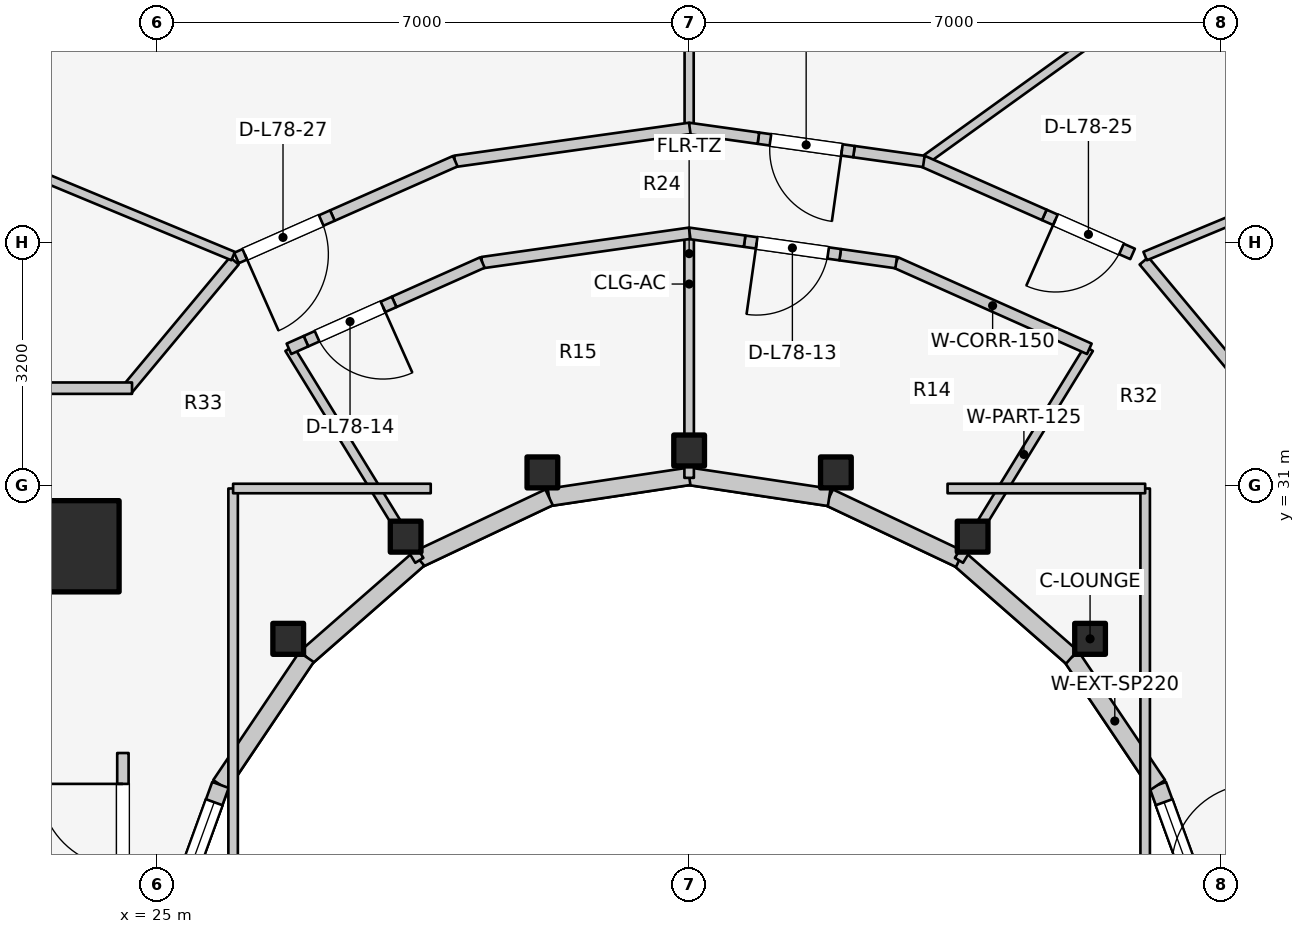
"""IFC4 building model, lengths in metres.
Left out: names, types, materials, properties, quantities, classifications, styles, units other than length and angle.
Written with IfcOpenShell. Run it as: python <this file> out.ifc"""

import sys

from ifc_helpers import new_model, si_unit, direction, frame, frame_2d, origin, origin_2d, place, context, subcontext, project, spatial, rectangle, i_section, extrude, element, fill, save


model = new_model("IFC4")
c1 = context("Model", 3, precision=1e-05, world=origin(), true_north=direction((0.0, 1.0)))
c2 = subcontext(c1, "Body", "Model", "MODEL_VIEW")
j1 = project(units=[si_unit("LENGTHUNIT", "METRE"), si_unit("PLANEANGLEUNIT", "RADIAN")], contexts=[c1])
p1 = place(None, origin())
s1 = spatial("IfcSite", under=j1, at=p1, CompositionType="ELEMENT")
p2 = place(p1, origin())
s2 = spatial("IfcBuilding", under=s1, at=p2, CompositionType="ELEMENT")
p3 = place(p2, frame((0.0, 0.0, 256.8)))
s3 = spatial("IfcBuildingStorey", under=s2, at=p3, CompositionType="ELEMENT", Elevation=256.8)
p4 = place(p3, frame((19.65, 30.35, 0.0), z_axis=(0.0, 0.0, 1.0), x_axis=(1.0, 0.0, 0.0)))
e1 = element("IfcWall", 1, at=p4, inside=s3, PredefinedType="SHEAR", context=c2, shape_type="SweptSolid", body=[
    extrude(rectangle(XDim=4.5, YDim=0.45, at=frame_2d((2.25, 0.0))), origin(), (0.0, 0.0, 1.0), 3.6),
])
p5 = place(p3, frame((23.9, 30.2, 0.0), z_axis=(0.0, 0.0, 1.0), x_axis=(1.0, 0.0, 0.0)))
e2 = element("IfcColumn", 2, at=p5, inside=s3, PredefinedType="COLUMN", context=c2, shape_type="SweptSolid", body=[
    extrude(rectangle(XDim=1.2, YDim=1.2, at=origin_2d()), origin(), (0.0, 0.0, 1.0), 3.6),
])
for number, where, z_axis, x_axis in (
    (3, (37.275, 28.982, 0.0), (0.0, 0.0, 1.0), (1.0, 0.0, 0.0)),
    (4, (35.73, 30.327, 0.0), (0.0, 0.0, 1.0), (1.0, 0.0, 0.0)),
    (5, (33.931, 31.172, 0.0), (0.0, 0.0, 1.0), (1.0, 0.0, 0.0)),
    (6, (32.0, 31.46, 0.0), (0.0, 0.0, 1.0), (1.0, 0.0, 0.0)),
    (7, (30.069, 31.172, 0.0), (0.0, 0.0, 1.0), (1.0, 0.0, 0.0)),
    (8, (28.27, 30.327, 0.0), (0.0, 0.0, 1.0), (1.0, 0.0, 0.0)),
    (9, (26.725, 28.982, 0.0), (0.0, 0.0, 1.0), (1.0, 0.0, 0.0)),
):
    element("IfcColumn", number, at=place(p3, frame(where, z_axis=z_axis, x_axis=x_axis)), inside=s3, PredefinedType="COLUMN", context=c2, shape_type="SweptSolid", body=[
        extrude(i_section(OverallWidth=0.404, OverallDepth=0.407, WebThickness=0.027, FlangeThickness=0.044, FilletRadius=0.025, at=origin_2d()), origin(), (0.0, 0.0, 1.0), 3.6),
    ])
p6 = place(p3, frame((38.877, 25.102, 0.0), z_axis=(0.0, 0.0, 1.0), x_axis=(-0.341423187295, 0.93990968033, 0.0)))
e10 = element("IfcWall", 10, at=p6, inside=s3, PredefinedType="STANDARD", context=c2, shape_type="SweptSolid", body=[
    extrude(rectangle(XDim=2.084, YDim=0.23, at=frame_2d((1.042, 0.0))), origin(), (0.0, 0.0, 1.0), 3.06),
])
p7 = place(p6, frame((0.242, 0.0, 0.85)))
e11 = element("IfcOpeningElement", 11, at=p7, cuts=e10, PredefinedType="OPENING", context=c2, shape_type="SweptSolid", body=[
    extrude(rectangle(XDim=1.6, YDim=1.65, at=frame_2d((0.8, 0.825))), frame((0.0, 0.125, 0.0), z_axis=(0.0, -1.0, 0.0), x_axis=(1.0, 0.0, 0.0)), (0.0, 0.0, 1.0), 0.25),
])
p8 = place(p3, frame((38.166, 27.06, 0.0), z_axis=(0.0, 0.0, 1.0), x_axis=(-0.558197800898, 0.829707909492, 0.0)))
e12 = element("IfcWall", 12, at=p8, inside=s3, PredefinedType="STANDARD", context=c2, shape_type="SweptSolid", body=[
    extrude(rectangle(XDim=2.027, YDim=0.23, at=frame_2d((1.013, 0.0))), origin(), (0.0, 0.0, 1.0), 1.72),
])
p9 = place(p3, frame((37.035, 28.742, 0.0), z_axis=(0.0, 0.0, 1.0), x_axis=(-0.752576694707, 0.658504607869, 0.0)))
e13 = element("IfcWall", 13, at=p9, inside=s3, PredefinedType="STANDARD", context=c2, shape_type="SweptSolid", body=[
    extrude(rectangle(XDim=1.959, YDim=0.23, at=frame_2d((0.98, 0.0))), origin(), (0.0, 0.0, 1.0), 1.72),
])
p10 = place(p3, frame((35.56, 30.032, 0.0), z_axis=(0.0, 0.0, 1.0), x_axis=(-0.904179699603, 0.427152280606, 0.0)))
e14 = element("IfcWall", 14, at=p10, inside=s3, PredefinedType="STANDARD", context=c2, shape_type="SweptSolid", body=[
    extrude(rectangle(XDim=1.899, YDim=0.23, at=frame_2d((0.95, 0.0))), origin(), (0.0, 0.0, 1.0), 1.72),
])
for number, where, z_axis, x_axis in (
    (15, (33.843, 30.843, 0.0), (0.0, 0.0, 1.0), (-0.989, 0.149, 0.0)),
    (16, (32.0, 31.12, 0.0), (0.0, 0.0, 1.0), (-0.989, -0.149, 0.0)),
):
    element("IfcWall", number, at=place(p3, frame(where, z_axis=z_axis, x_axis=x_axis)), inside=s3, PredefinedType="STANDARD", context=c2, shape_type="SweptSolid", body=[
        extrude(rectangle(XDim=1.864, YDim=0.23, at=frame_2d((0.932, 0.0))), origin(), (0.0, 0.0, 1.0), 1.72),
    ])
p11 = place(p3, frame((30.157, 30.843, 0.0), z_axis=(0.0, 0.0, 1.0), x_axis=(-0.904179699603, -0.427152280606, 0.0)))
e17 = element("IfcWall", 17, at=p11, inside=s3, PredefinedType="STANDARD", context=c2, shape_type="SweptSolid", body=[
    extrude(rectangle(XDim=1.899, YDim=0.23, at=frame_2d((0.95, 0.0))), origin(), (0.0, 0.0, 1.0), 1.72),
])
p12 = place(p3, frame((28.44, 30.032, 0.0), z_axis=(0.0, 0.0, 1.0), x_axis=(-0.752576694707, -0.658504607869, 0.0)))
e18 = element("IfcWall", 18, at=p12, inside=s3, PredefinedType="STANDARD", context=c2, shape_type="SweptSolid", body=[
    extrude(rectangle(XDim=1.959, YDim=0.23, at=frame_2d((0.98, 0.0))), origin(), (0.0, 0.0, 1.0), 1.72),
])
p13 = place(p3, frame((26.965, 28.742, 0.0), z_axis=(0.0, 0.0, 1.0), x_axis=(-0.558197800898, -0.829707909492, 0.0)))
e19 = element("IfcWall", 19, at=p13, inside=s3, PredefinedType="STANDARD", context=c2, shape_type="SweptSolid", body=[
    extrude(rectangle(XDim=2.027, YDim=0.23, at=frame_2d((1.013, 0.0))), origin(), (0.0, 0.0, 1.0), 1.72),
])
p14 = place(p3, frame((25.834, 27.06, 0.0), z_axis=(0.0, 0.0, 1.0), x_axis=(-0.341423187295, -0.93990968033, 0.0)))
e20 = element("IfcWall", 20, at=p14, inside=s3, PredefinedType="STANDARD", context=c2, shape_type="SweptSolid", body=[
    extrude(rectangle(XDim=2.084, YDim=0.23, at=frame_2d((1.042, 0.0))), origin(), (0.0, 0.0, 1.0), 3.06),
])
p15 = place(p14, frame((0.242, 0.0, 0.85)))
e21 = element("IfcOpeningElement", 21, at=p15, cuts=e20, PredefinedType="OPENING", context=c2, shape_type="SweptSolid", body=[
    extrude(rectangle(XDim=1.6, YDim=1.65, at=frame_2d((0.8, 0.825))), frame((0.0, 0.125, 0.0), z_axis=(0.0, -1.0, 0.0), x_axis=(1.0, 0.0, 0.0)), (0.0, 0.0, 1.0), 0.25),
])
p16 = place(p3, frame((24.55, 24.08, 0.0), z_axis=(0.0, 0.0, 1.0), x_axis=(0.0, 1.0, 0.0)))
e22 = element("IfcWall", 22, at=p16, inside=s3, PredefinedType="PARTITIONING", context=c2, shape_type="SweptSolid", body=[
    extrude(rectangle(XDim=3.4, YDim=0.15, at=frame_2d((1.7, 0.0))), origin(), (0.0, 0.0, 1.0), 3.075),
])
p17 = place(p16, frame((1.894, 0.0, 0.0)))
e23 = element("IfcOpeningElement", 23, at=p17, cuts=e22, PredefinedType="OPENING", context=c2, shape_type="SweptSolid", body=[
    extrude(rectangle(XDim=1.1, YDim=2.1, at=frame_2d((0.55, 1.05))), frame((0.0, 0.085, 0.0), z_axis=(0.0, -1.0, 0.0), x_axis=(1.0, 0.0, 0.0)), (0.0, 0.0, 1.0), 0.17),
])
p18 = place(p3, frame((35.55, 30.015, 0.0), z_axis=(0.0, 0.0, 1.0), x_axis=(0.522763432117, 0.852477796802, 0.0)))
e24 = element("IfcWall", 24, at=p18, inside=s3, PredefinedType="PARTITIONING", context=c2, shape_type="SweptSolid", body=[
    extrude(rectangle(XDim=3.269, YDim=0.125, at=frame_2d((1.635, 0.0))), origin(), (0.0, 0.0, 1.0), 1.72),
])
p19 = place(p3, frame((32.0, 31.1, 0.0), z_axis=(0.0, 0.0, 1.0), x_axis=(0.0, 1.0, 0.0)))
e25 = element("IfcWall", 25, at=p19, inside=s3, PredefinedType="PARTITIONING", context=c2, shape_type="SweptSolid", body=[
    extrude(rectangle(XDim=3.218, YDim=0.125, at=frame_2d((1.609, 0.0))), origin(), (0.0, 0.0, 1.0), 1.72),
])
p20 = place(p3, frame((28.45, 30.015, 0.0), z_axis=(0.0, 0.0, 1.0), x_axis=(-0.522763432117, 0.852477796802, 0.0)))
e26 = element("IfcWall", 26, at=p20, inside=s3, PredefinedType="PARTITIONING", context=c2, shape_type="SweptSolid", body=[
    extrude(rectangle(XDim=3.269, YDim=0.125, at=frame_2d((1.635, 0.0))), origin(), (0.0, 0.0, 1.0), 1.72),
])
p21 = place(p3, frame((37.265, 32.798, 0.0), z_axis=(0.0, 0.0, 1.0), x_axis=(-0.913254317828, 0.407389924971, 0.0)))
e27 = element("IfcWall", 27, at=p21, inside=s3, PredefinedType="PARTITIONING", context=c2, shape_type="SweptSolid", body=[
    extrude(rectangle(XDim=2.787, YDim=0.15, at=frame_2d((1.393, 0.0))), origin(), (0.0, 0.0, 1.0), 1.72),
])
p22 = place(p3, frame((34.724, 33.932, 0.0), z_axis=(0.0, 0.0, 1.0), x_axis=(-0.990190745647, 0.13972217875, 0.0)))
e28 = element("IfcWall", 28, at=p22, inside=s3, PredefinedType="PARTITIONING", context=c2, shape_type="SweptSolid", body=[
    extrude(rectangle(XDim=0.744, YDim=0.15, at=frame_2d((0.372, 0.0))), origin(), (0.0, 0.0, 1.0), 3.075),
])
p23 = place(p3, frame((33.987, 34.036, 0.0), z_axis=(0.0, 0.0, 1.0), x_axis=(-0.990133183593, 0.140129507055, 0.0)))
e29 = element("IfcWall", 29, at=p23, inside=s3, PredefinedType="PARTITIONING", context=c2, shape_type="SweptSolid", body=[
    extrude(rectangle(XDim=1.27, YDim=0.15, at=frame_2d((0.635, 0.0))), origin(), (0.0, 0.0, 1.0), 3.075),
])
p24 = place(p23, frame((0.16, 0.0, 0.0)))
e30 = element("IfcOpeningElement", 30, at=p24, cuts=e29, PredefinedType="OPENING", context=c2, shape_type="SweptSolid", body=[
    extrude(rectangle(XDim=0.95, YDim=2.1, at=frame_2d((0.475, 1.05))), frame((0.0, 0.085, 0.0), z_axis=(0.0, -1.0, 0.0), x_axis=(1.0, 0.0, 0.0)), (0.0, 0.0, 1.0), 0.17),
])
p25 = place(p3, frame((32.729, 34.214, 0.0), z_axis=(0.0, 0.0, 1.0), x_axis=(-0.990138882688, 0.140089232242, 0.0)))
e31 = element("IfcWall", 31, at=p25, inside=s3, PredefinedType="PARTITIONING", context=c2, shape_type="SweptSolid", body=[
    extrude(rectangle(XDim=0.744, YDim=0.15, at=frame_2d((0.372, 0.0))), origin(), (0.0, 0.0, 1.0), 1.72),
])
p26 = place(p3, frame((32.007, 34.318, 0.0), z_axis=(0.0, 0.0, 1.0), x_axis=(-0.990150268487, -0.140008734782, 0.0)))
e32 = element("IfcWall", 32, at=p26, inside=s3, PredefinedType="PARTITIONING", context=c2, shape_type="SweptSolid", body=[
    extrude(rectangle(XDim=2.759, YDim=0.15, at=frame_2d((1.379, 0.0))), origin(), (0.0, 0.0, 1.0), 1.72),
])
p27 = place(p3, frame((29.28, 33.933, 0.0), z_axis=(0.0, 0.0, 1.0), x_axis=(-0.913224654076, -0.407456416305, 0.0)))
e33 = element("IfcWall", 33, at=p27, inside=s3, PredefinedType="PARTITIONING", context=c2, shape_type="SweptSolid", body=[
    extrude(rectangle(XDim=1.271, YDim=0.15, at=frame_2d((0.636, 0.0))), origin(), (0.0, 0.0, 1.0), 1.72),
])
p28 = place(p3, frame((28.118, 33.415, 0.0), z_axis=(0.0, 0.0, 1.0), x_axis=(-0.913351162958, -0.407172755871, 0.0)))
e34 = element("IfcWall", 34, at=p28, inside=s3, PredefinedType="PARTITIONING", context=c2, shape_type="SweptSolid", body=[
    extrude(rectangle(XDim=1.27, YDim=0.15, at=frame_2d((0.635, 0.0))), origin(), (0.0, 0.0, 1.0), 2.16),
])
p29 = place(p28, frame((0.16, 0.0, 0.0)))
e35 = element("IfcOpeningElement", 35, at=p29, cuts=e34, PredefinedType="OPENING", context=c2, shape_type="SweptSolid", body=[
    extrude(rectangle(XDim=0.95, YDim=2.1, at=frame_2d((0.475, 1.05))), frame((0.0, 0.085, 0.0), z_axis=(0.0, -1.0, 0.0), x_axis=(1.0, 0.0, 0.0)), (0.0, 0.0, 1.0), 0.17),
])
p30 = place(p3, frame((26.958, 32.898, 0.0), z_axis=(0.0, 0.0, 1.0), x_axis=(-0.912906122814, -0.408169585991, 0.0)))
e36 = element("IfcWall", 36, at=p30, inside=s3, PredefinedType="PARTITIONING", context=c2, shape_type="SweptSolid", body=[
    extrude(rectangle(XDim=0.245, YDim=0.15, at=frame_2d((0.123, 0.0))), origin(), (0.0, 0.0, 1.0), 3.075),
])
p31 = place(p3, frame((26.0, 25.8, 0.0), z_axis=(0.0, 0.0, 1.0), x_axis=(0.0, 1.0, 0.0)))
e37 = element("IfcWall", 37, at=p31, inside=s3, PredefinedType="PARTITIONING", context=c2, shape_type="SweptSolid", body=[
    extrude(rectangle(XDim=5.16, YDim=0.125, at=frame_2d((2.58, 0.0))), origin(), (0.0, 0.0, 1.0), 2.452),
])
p32 = place(p3, frame((26.0, 30.96, 0.0), z_axis=(0.0, 0.0, 1.0), x_axis=(1.0, 0.0, 0.0)))
e38 = element("IfcWall", 38, at=p32, inside=s3, PredefinedType="PARTITIONING", context=c2, shape_type="SweptSolid", body=[
    extrude(rectangle(XDim=2.6, YDim=0.125, at=frame_2d((1.3, 0.0))), origin(), (0.0, 0.0, 1.0), 1.72),
])
p33 = place(p3, frame((38.0, 25.8, 0.0), z_axis=(0.0, 0.0, 1.0), x_axis=(0.0, 1.0, 0.0)))
e39 = element("IfcWall", 39, at=p33, inside=s3, PredefinedType="PARTITIONING", context=c2, shape_type="SweptSolid", body=[
    extrude(rectangle(XDim=5.16, YDim=0.125, at=frame_2d((2.58, 0.0))), origin(), (0.0, 0.0, 1.0), 2.452),
])
p34 = place(p3, frame((35.4, 30.96, 0.0), z_axis=(0.0, 0.0, 1.0), x_axis=(1.0, 0.0, 0.0)))
e40 = element("IfcWall", 40, at=p34, inside=s3, PredefinedType="PARTITIONING", context=c2, shape_type="SweptSolid", body=[
    extrude(rectangle(XDim=2.6, YDim=0.125, at=frame_2d((1.3, 0.0))), origin(), (0.0, 0.0, 1.0), 1.72),
])
for number, where, z_axis, x_axis in (
    (41, (37.984, 33.955, 0.0), (0.0, 0.0, 1.0), (0.64, -0.768, 0.0)),
    (42, (26.016, 33.955, 0.0), (0.0, 0.0, 1.0), (-0.64, -0.768, 0.0)),
):
    element("IfcWall", number, at=place(p3, frame(where, z_axis=z_axis, x_axis=x_axis)), inside=s3, PredefinedType="PARTITIONING", context=c2, shape_type="SweptSolid", body=[
        extrude(rectangle(XDim=2.21, YDim=0.15, at=frame_2d((1.105, 0.0))), origin(), (0.0, 0.0, 1.0), 1.72),
    ])
p35 = place(p3, frame((19.452, 32.28, 0.0), z_axis=(0.0, 0.0, 1.0), x_axis=(1.0, 0.0, 0.0)))
e43 = element("IfcWall", 43, at=p35, inside=s3, PredefinedType="PARTITIONING", context=c2, shape_type="SweptSolid", body=[
    extrude(rectangle(XDim=5.218, YDim=0.15, at=frame_2d((2.609, 0.0))), origin(), (0.0, 0.0, 1.0), 1.72),
])
p36 = place(p3, frame((38.0, 34.018, 0.0), z_axis=(0.0, 0.0, 1.0), x_axis=(0.92349333748, 0.383614462228, 0.0)))
e44 = element("IfcWall", 44, at=p36, inside=s3, PredefinedType="MOVABLE", context=c2, shape_type="SweptSolid", body=[
    extrude(rectangle(XDim=5.907, YDim=0.12, at=frame_2d((2.954, 0.0))), origin(), (0.0, 0.0, 1.0), 1.72),
])
p37 = place(p3, frame((35.124, 35.297, 0.0), z_axis=(0.0, 0.0, 1.0), x_axis=(0.811745719064, 0.584011033783, 0.0)))
e45 = element("IfcWall", 45, at=p37, inside=s3, PredefinedType="MOVABLE", context=c2, shape_type="SweptSolid", body=[
    extrude(rectangle(XDim=4.534, YDim=0.12, at=frame_2d((2.267, 0.0))), origin(), (0.0, 0.0, 1.0), 1.72),
])
p38 = place(p3, frame((32.0, 35.753, 0.0), z_axis=(0.0, 0.0, 1.0), x_axis=(0.0, 1.0, 0.0)))
e46 = element("IfcWall", 46, at=p38, inside=s3, PredefinedType="MOVABLE", context=c2, shape_type="SweptSolid", body=[
    extrude(rectangle(XDim=2.727, YDim=0.12, at=frame_2d((1.364, 0.0))), origin(), (0.0, 0.0, 1.0), 1.72),
])
p39 = place(p3, frame((26.0, 34.018, 0.0), z_axis=(0.0, 0.0, 1.0), x_axis=(-0.92349333748, 0.383614462228, 0.0)))
e47 = element("IfcWall", 47, at=p39, inside=s3, PredefinedType="MOVABLE", context=c2, shape_type="SweptSolid", body=[
    extrude(rectangle(XDim=5.907, YDim=0.12, at=frame_2d((2.954, 0.0))), origin(), (0.0, 0.0, 1.0), 1.72),
])
p40 = place(p3, frame((37.834, 34.046, 0.0), z_axis=(0.0, 0.0, 1.0), x_axis=(-0.914641976237, 0.404264833129, 0.0)))
e48 = element("IfcWall", 48, at=p40, inside=s3, PredefinedType="PARTITIONING", context=c2, shape_type="SweptSolid", body=[
    extrude(rectangle(XDim=1.27, YDim=0.15, at=frame_2d((0.635, 0.0))), origin(), (0.0, 0.0, 1.0), 2.16),
])
p41 = place(p40, frame((0.16, 0.0, 0.0)))
e49 = element("IfcOpeningElement", 49, at=p41, cuts=e48, PredefinedType="OPENING", context=c2, shape_type="SweptSolid", body=[
    extrude(rectangle(XDim=0.95, YDim=2.1, at=frame_2d((0.475, 1.05))), frame((0.0, 0.085, 0.0), z_axis=(0.0, -1.0, 0.0), x_axis=(1.0, 0.0, 0.0)), (0.0, 0.0, 1.0), 0.17),
])
p42 = place(p3, frame((36.673, 34.56, 0.0), z_axis=(0.0, 0.0, 1.0), x_axis=(-0.914643439219, 0.404261523143, 0.0)))
e50 = element("IfcWall", 50, at=p42, inside=s3, PredefinedType="PARTITIONING", context=c2, shape_type="SweptSolid", body=[
    extrude(rectangle(XDim=1.751, YDim=0.15, at=frame_2d((0.875, 0.0))), origin(), (0.0, 0.0, 1.0), 1.72),
])
p43 = place(p3, frame((35.087, 35.263, 0.0), z_axis=(0.0, 0.0, 1.0), x_axis=(-0.990267912895, 0.139174209862, 0.0)))
e51 = element("IfcWall", 51, at=p43, inside=s3, PredefinedType="PARTITIONING", context=c2, shape_type="SweptSolid", body=[
    extrude(rectangle(XDim=0.928, YDim=0.15, at=frame_2d((0.464, 0.0))), origin(), (0.0, 0.0, 1.0), 3.075),
])
p44 = place(p3, frame((34.168, 35.392, 0.0), z_axis=(0.0, 0.0, 1.0), x_axis=(-0.990266103741, 0.139187081947, 0.0)))
e52 = element("IfcWall", 52, at=p44, inside=s3, PredefinedType="PARTITIONING", context=c2, shape_type="SweptSolid", body=[
    extrude(rectangle(XDim=1.27, YDim=0.15, at=frame_2d((0.635, 0.0))), origin(), (0.0, 0.0, 1.0), 3.075),
])
p45 = place(p44, frame((0.16, 0.0, 0.0)))
e53 = element("IfcOpeningElement", 53, at=p45, cuts=e52, PredefinedType="OPENING", context=c2, shape_type="SweptSolid", body=[
    extrude(rectangle(XDim=0.95, YDim=2.1, at=frame_2d((0.475, 1.05))), frame((0.0, 0.085, 0.0), z_axis=(0.0, -1.0, 0.0), x_axis=(1.0, 0.0, 0.0)), (0.0, 0.0, 1.0), 0.17),
])
p46 = place(p3, frame((32.911, 35.569, 0.0), z_axis=(0.0, 0.0, 1.0), x_axis=(-0.990273006801, 0.139137960318, 0.0)))
e54 = element("IfcWall", 54, at=p46, inside=s3, PredefinedType="PARTITIONING", context=c2, shape_type="SweptSolid", body=[
    extrude(rectangle(XDim=0.928, YDim=0.15, at=frame_2d((0.464, 0.0))), origin(), (0.0, 0.0, 1.0), 1.72),
])
p47 = place(p3, frame((32.008, 35.698, 0.0), z_axis=(0.0, 0.0, 1.0), x_axis=(-0.990317017221, -0.138824368909, 0.0)))
e55 = element("IfcWall", 55, at=p47, inside=s3, PredefinedType="PARTITIONING", context=c2, shape_type="SweptSolid", body=[
    extrude(rectangle(XDim=3.12, YDim=0.15, at=frame_2d((1.56, 0.0))), origin(), (0.0, 0.0, 1.0), 1.72),
])
p48 = place(p3, frame((28.923, 35.266, 0.0), z_axis=(0.0, 0.0, 1.0), x_axis=(-0.914533372748, -0.404510457381, 0.0)))
e56 = element("IfcWall", 56, at=p48, inside=s3, PredefinedType="PARTITIONING", context=c2, shape_type="SweptSolid", body=[
    extrude(rectangle(XDim=1.768, YDim=0.15, at=frame_2d((0.884, 0.0))), origin(), (0.0, 0.0, 1.0), 1.72),
])
p49 = place(p3, frame((27.306, 34.551, 0.0), z_axis=(0.0, 0.0, 1.0), x_axis=(-0.914517719088, -0.404545845949, 0.0)))
e57 = element("IfcWall", 57, at=p49, inside=s3, PredefinedType="PARTITIONING", context=c2, shape_type="SweptSolid", body=[
    extrude(rectangle(XDim=1.38, YDim=0.15, at=frame_2d((0.69, 0.0))), origin(), (0.0, 0.0, 1.0), 2.16),
])
p50 = place(p49, frame((0.16, 0.0, 0.0)))
e58 = element("IfcOpeningElement", 58, at=p50, cuts=e57, PredefinedType="OPENING", context=c2, shape_type="SweptSolid", body=[
    extrude(rectangle(XDim=1.1, YDim=2.1, at=frame_2d((0.55, 1.05))), frame((0.0, 0.085, 0.0), z_axis=(0.0, -1.0, 0.0), x_axis=(1.0, 0.0, 0.0)), (0.0, 0.0, 1.0), 0.17),
])
p51 = place(p7, origin())
e59 = element("IfcWindow", 59, at=p51, inside=s3, PartitioningType="SINGLE_PANEL", PredefinedType="WINDOW", context=c2, shape_type="SweptSolid", body=[
    extrude(rectangle(XDim=1.6, YDim=1.65, at=frame_2d((0.8, 0.825))), frame((0.0, 0.03, 0.0), z_axis=(0.0, -1.0, 0.0), x_axis=(1.0, 0.0, 0.0)), (0.0, 0.0, 1.0), 0.06),
])
fill(e11, e59)
p52 = place(p15, origin())
e60 = element("IfcWindow", 60, at=p52, inside=s3, PartitioningType="SINGLE_PANEL", PredefinedType="WINDOW", context=c2, shape_type="SweptSolid", body=[
    extrude(rectangle(XDim=1.6, YDim=1.65, at=frame_2d((0.8, 0.825))), frame((0.0, 0.03, 0.0), z_axis=(0.0, -1.0, 0.0), x_axis=(1.0, 0.0, 0.0)), (0.0, 0.0, 1.0), 0.06),
])
fill(e21, e60)
p53 = place(p17, origin())
e61 = element("IfcDoor", 61, at=p53, inside=s3, OperationType="SINGLE_SWING_RIGHT", PredefinedType="DOOR", context=c2, shape_type="SweptSolid", body=[
    extrude(rectangle(XDim=1.1, YDim=2.1, at=frame_2d((0.55, 1.05))), frame((0.0, 0.025, 0.0), z_axis=(0.0, -1.0, 0.0), x_axis=(1.0, 0.0, 0.0)), (0.0, 0.0, 1.0), 0.05),
])
fill(e23, e61)
p54 = place(p24, origin())
e62 = element("IfcDoor", 62, at=p54, inside=s3, OperationType="SINGLE_SWING_RIGHT", PredefinedType="DOOR", context=c2, shape_type="SweptSolid", body=[
    extrude(rectangle(XDim=0.95, YDim=2.1, at=frame_2d((0.475, 1.05))), frame((0.0, 0.025, 0.0), z_axis=(0.0, -1.0, 0.0), x_axis=(1.0, 0.0, 0.0)), (0.0, 0.0, 1.0), 0.05),
])
fill(e30, e62)
p55 = place(p29, origin())
e63 = element("IfcDoor", 63, at=p55, inside=s3, OperationType="SINGLE_SWING_LEFT", PredefinedType="DOOR", context=c2, shape_type="SweptSolid", body=[
    extrude(rectangle(XDim=0.95, YDim=2.1, at=frame_2d((0.475, 1.05))), frame((0.0, 0.025, 0.0), z_axis=(0.0, -1.0, 0.0), x_axis=(1.0, 0.0, 0.0)), (0.0, 0.0, 1.0), 0.05),
])
fill(e35, e63)
p56 = place(p41, origin())
e64 = element("IfcDoor", 64, at=p56, inside=s3, OperationType="SINGLE_SWING_RIGHT", PredefinedType="DOOR", context=c2, shape_type="SweptSolid", body=[
    extrude(rectangle(XDim=0.95, YDim=2.1, at=frame_2d((0.475, 1.05))), frame((0.0, 0.025, 0.0), z_axis=(0.0, -1.0, 0.0), x_axis=(1.0, 0.0, 0.0)), (0.0, 0.0, 1.0), 0.05),
])
fill(e49, e64)
p57 = place(p45, origin())
e65 = element("IfcDoor", 65, at=p57, inside=s3, OperationType="SINGLE_SWING_LEFT", PredefinedType="DOOR", context=c2, shape_type="SweptSolid", body=[
    extrude(rectangle(XDim=0.95, YDim=2.1, at=frame_2d((0.475, 1.05))), frame((0.0, 0.025, 0.0), z_axis=(0.0, -1.0, 0.0), x_axis=(1.0, 0.0, 0.0)), (0.0, 0.0, 1.0), 0.05),
])
fill(e53, e65)
p58 = place(p50, origin())
e66 = element("IfcDoor", 66, at=p58, inside=s3, OperationType="SINGLE_SWING_RIGHT", PredefinedType="DOOR", context=c2, shape_type="SweptSolid", body=[
    extrude(rectangle(XDim=1.1, YDim=2.1, at=frame_2d((0.55, 1.05))), frame((0.0, 0.025, 0.0), z_axis=(0.0, -1.0, 0.0), x_axis=(1.0, 0.0, 0.0)), (0.0, 0.0, 1.0), 0.05),
])
fill(e58, e66)
save(model, sys.argv[1])
